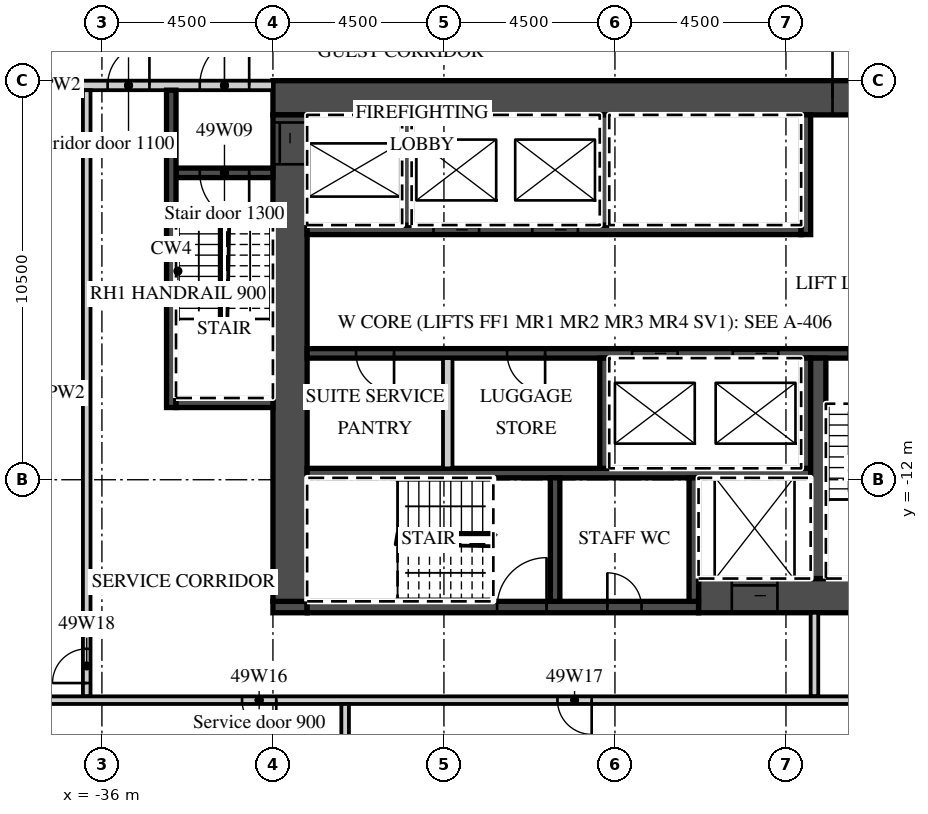
"""IFC4 building model, lengths in metres.
Left out: names, types, materials, properties, quantities, classifications, styles, units other than length and angle.
Written with IfcOpenShell. Run it as: python <this file> out.ifc"""

import sys

from ifc_helpers import new_model, si_unit, direction, frame, frame_2d, origin, place, context, subcontext, project, spatial, rectangle, extrude, element, fill, save


model = new_model("IFC4")
c1 = context("Model", 3, precision=1e-05, world=origin(), true_north=direction((0.0, 1.0)))
c2 = subcontext(c1, "Body", "Model", "MODEL_VIEW")
j1 = project(units=[si_unit("LENGTHUNIT", "METRE"), si_unit("PLANEANGLEUNIT", "RADIAN")], contexts=[c1])
p1 = place(None, origin())
s1 = spatial("IfcSite", under=j1, at=p1, CompositionType="ELEMENT")
p2 = place(p1, origin())
s2 = spatial("IfcBuilding", under=s1, at=p2, CompositionType="ELEMENT")
p3 = place(p2, frame((0.0, 0.0, 203.2)))
s3 = spatial("IfcBuildingStorey", under=s2, at=p3, CompositionType="ELEMENT", Elevation=203.2)
p4 = place(p3, frame((-31.5, -1.95, 0.0), z_axis=(0.0, 0.0, 1.0), x_axis=(1.0, 0.0, 0.0)))
e1 = element("IfcWall", 1, at=p4, inside=s3, PredefinedType="SHEAR", context=c2, shape_type="SweptSolid", body=[
    extrude(rectangle(XDim=18.0, YDim=0.9, at=frame_2d((9.0, 0.0))), origin(), (0.0, 0.0, 1.0), 3.0),
])
p5 = place(p4, frame((14.725, 0.0, 0.0)))
e2 = element("IfcOpeningElement", 2, at=p5, cuts=e1, PredefinedType="OPENING", context=c2, shape_type="SweptSolid", body=[
    extrude(rectangle(XDim=1.8, YDim=2.1, at=frame_2d((0.9, 1.05))), frame((0.0, 0.46, 0.0), z_axis=(0.0, -1.0, 0.0), x_axis=(1.0, 0.0, 0.0)), (0.0, 0.0, 1.0), 0.92),
])
p6 = place(p3, frame((-20.3, -15.05, 0.0), z_axis=(0.0, 0.0, 1.0), x_axis=(1.0, 0.0, 0.0)))
e3 = element("IfcWall", 3, at=p6, inside=s3, PredefinedType="SHEAR", context=c2, shape_type="SweptSolid", body=[
    extrude(rectangle(XDim=6.8, YDim=0.9, at=frame_2d((3.4, 0.0))), origin(), (0.0, 0.0, 1.0), 3.0),
])
p7 = place(p6, frame((0.875, 0.0, 0.0)))
e4 = element("IfcOpeningElement", 4, at=p7, cuts=e3, PredefinedType="OPENING", context=c2, shape_type="SweptSolid", body=[
    extrude(rectangle(XDim=1.2, YDim=2.1, at=frame_2d((0.6, 1.05))), frame((0.0, 0.46, 0.0), z_axis=(0.0, -1.0, 0.0), x_axis=(1.0, 0.0, 0.0)), (0.0, 0.0, 1.0), 0.92),
])
p8 = place(p3, frame((-31.5, -15.35, 0.0), z_axis=(0.0, 0.0, 1.0), x_axis=(1.0, 0.0, 0.0)))
e5 = element("IfcWall", 5, at=p8, inside=s3, PredefinedType="SHEAR", context=c2, shape_type="SweptSolid", body=[
    extrude(rectangle(XDim=0.9, YDim=0.3, at=frame_2d((0.45, 0.0))), origin(), (0.0, 0.0, 1.0), 3.0),
])
p9 = place(p3, frame((-30.6, -15.35, 0.0), z_axis=(0.0, 0.0, 1.0), x_axis=(1.0, 0.0, 0.0)))
e6 = element("IfcWall", 6, at=p9, inside=s3, PredefinedType="SHEAR", context=c2, shape_type="SweptSolid", body=[
    extrude(rectangle(XDim=10.3, YDim=0.3, at=frame_2d((5.15, 0.0))), origin(), (0.0, 0.0, 1.0), 3.0),
])
p10 = place(p9, frame((5.0, 0.0, 0.0)))
e7 = element("IfcOpeningElement", 7, at=p10, cuts=e6, PredefinedType="OPENING", context=c2, shape_type="SweptSolid", body=[
    extrude(rectangle(XDim=1.3, YDim=2.1, at=frame_2d((0.65, 1.05))), frame((0.0, 0.16, 0.0), z_axis=(0.0, -1.0, 0.0), x_axis=(1.0, 0.0, 0.0)), (0.0, 0.0, 1.0), 0.32),
])
p11 = place(p9, frame((7.9, 0.0, 0.0)))
e8 = element("IfcOpeningElement", 8, at=p11, cuts=e6, PredefinedType="OPENING", context=c2, shape_type="SweptSolid", body=[
    extrude(rectangle(XDim=0.9, YDim=2.1, at=frame_2d((0.45, 1.05))), frame((0.0, 0.16, 0.0), z_axis=(0.0, -1.0, 0.0), x_axis=(1.0, 0.0, 0.0)), (0.0, 0.0, 1.0), 0.32),
])
p12 = place(p3, frame((-31.05, -15.2, 0.0), z_axis=(0.0, 0.0, 1.0), x_axis=(0.0, 1.0, 0.0)))
e9 = element("IfcWall", 9, at=p12, inside=s3, PredefinedType="SHEAR", context=c2, shape_type="SweptSolid", body=[
    extrude(rectangle(XDim=12.8, YDim=0.9, at=frame_2d((6.4, 0.0))), origin(), (0.0, 0.0, 1.0), 3.0),
])
p13 = place(p12, frame((11.5, 0.0, 0.0)))
e10 = element("IfcOpeningElement", 10, at=p13, cuts=e9, PredefinedType="OPENING", context=c2, shape_type="SweptSolid", body=[
    extrude(rectangle(XDim=1.1, YDim=2.1, at=frame_2d((0.55, 1.05))), frame((0.0, 0.46, 0.0), z_axis=(0.0, -1.0, 0.0), x_axis=(1.0, 0.0, 0.0)), (0.0, 0.0, 1.0), 0.92),
])
p14 = place(p3, frame((-30.6, -5.425, 0.0), z_axis=(0.0, 0.0, 1.0), x_axis=(1.0, 0.0, 0.0)))
e11 = element("IfcWall", 11, at=p14, inside=s3, PredefinedType="SHEAR", context=c2, shape_type="SweptSolid", body=[
    extrude(rectangle(XDim=13.0, YDim=0.25, at=frame_2d((6.5, 0.0))), origin(), (0.0, 0.0, 1.0), 3.0),
])
p15 = place(p14, frame((3.325, 0.0, 0.0)))
e12 = element("IfcOpeningElement", 12, at=p15, cuts=e11, PredefinedType="OPENING", context=c2, shape_type="SweptSolid", body=[
    extrude(rectangle(XDim=1.2, YDim=2.1, at=frame_2d((0.6, 1.05))), frame((0.0, 0.135, 0.0), z_axis=(0.0, -1.0, 0.0), x_axis=(1.0, 0.0, 0.0)), (0.0, 0.0, 1.0), 0.27),
])
p16 = place(p14, frame((5.925, 0.0, 0.0)))
e13 = element("IfcOpeningElement", 13, at=p16, cuts=e11, PredefinedType="OPENING", context=c2, shape_type="SweptSolid", body=[
    extrude(rectangle(XDim=1.2, YDim=2.1, at=frame_2d((0.6, 1.05))), frame((0.0, 0.135, 0.0), z_axis=(0.0, -1.0, 0.0), x_axis=(1.0, 0.0, 0.0)), (0.0, 0.0, 1.0), 0.27),
])
p17 = place(p3, frame((-17.475, -5.55, 0.0), z_axis=(0.0, 0.0, 1.0), x_axis=(0.0, 1.0, 0.0)))
e14 = element("IfcWall", 14, at=p17, inside=s3, PredefinedType="SHEAR", context=c2, shape_type="SweptSolid", body=[
    extrude(rectangle(XDim=3.15, YDim=0.25, at=frame_2d((1.575, 0.0))), origin(), (0.0, 0.0, 1.0), 3.0),
])
for number, where, z_axis, x_axis in (
    (15, (-27.975, -5.3, 0.0), (0.0, 0.0, 1.0), (0.0, 1.0, 0.0)),
    (16, (-22.775, -5.3, 0.0), (0.0, 0.0, 1.0), (0.0, 1.0, 0.0)),
):
    element("IfcWall", number, at=place(p3, frame(where, z_axis=z_axis, x_axis=x_axis)), inside=s3, PredefinedType="SHEAR", context=c2, shape_type="SweptSolid", body=[
        extrude(rectangle(XDim=2.9, YDim=0.25, at=frame_2d((1.45, 0.0))), origin(), (0.0, 0.0, 1.0), 3.0),
    ])
p18 = place(p3, frame((-30.6, -8.675, 0.0), z_axis=(0.0, 0.0, 1.0), x_axis=(1.0, 0.0, 0.0)))
e17 = element("IfcWall", 17, at=p18, inside=s3, PredefinedType="SHEAR", context=c2, shape_type="SweptSolid", body=[
    extrude(rectangle(XDim=16.2, YDim=0.25, at=frame_2d((8.1, 0.0))), origin(), (0.0, 0.0, 1.0), 3.0),
])
p19 = place(p18, frame((8.55, 0.0, 0.0)))
e18 = element("IfcOpeningElement", 18, at=p19, cuts=e17, PredefinedType="OPENING", context=c2, shape_type="SweptSolid", body=[
    extrude(rectangle(XDim=1.2, YDim=2.1, at=frame_2d((0.6, 1.05))), frame((0.0, 0.135, 0.0), z_axis=(0.0, -1.0, 0.0), x_axis=(1.0, 0.0, 0.0)), (0.0, 0.0, 1.0), 0.27),
])
p20 = place(p18, frame((11.2, 0.0, 0.0)))
e19 = element("IfcOpeningElement", 19, at=p20, cuts=e17, PredefinedType="OPENING", context=c2, shape_type="SweptSolid", body=[
    extrude(rectangle(XDim=1.2, YDim=2.1, at=frame_2d((0.6, 1.05))), frame((0.0, 0.135, 0.0), z_axis=(0.0, -1.0, 0.0), x_axis=(1.0, 0.0, 0.0)), (0.0, 0.0, 1.0), 0.27),
])
p21 = place(p18, frame((14.25, 0.0, 0.0)))
e20 = element("IfcOpeningElement", 20, at=p21, cuts=e17, PredefinedType="OPENING", context=c2, shape_type="SweptSolid", body=[
    extrude(rectangle(XDim=1.3, YDim=2.1, at=frame_2d((0.65, 1.05))), frame((0.0, 0.135, 0.0), z_axis=(0.0, -1.0, 0.0), x_axis=(1.0, 0.0, 0.0)), (0.0, 0.0, 1.0), 0.27),
])
p22 = place(p18, frame((1.288, 0.0, 0.0)))
e21 = element("IfcOpeningElement", 21, at=p22, cuts=e17, PredefinedType="OPENING", context=c2, shape_type="SweptSolid", body=[
    extrude(rectangle(XDim=1.0, YDim=2.1, at=frame_2d((0.5, 1.05))), frame((0.0, 0.135, 0.0), z_axis=(0.0, -1.0, 0.0), x_axis=(1.0, 0.0, 0.0)), (0.0, 0.0, 1.0), 0.27),
])
p23 = place(p18, frame((5.262, 0.0, 0.0)))
e22 = element("IfcOpeningElement", 22, at=p23, cuts=e17, PredefinedType="OPENING", context=c2, shape_type="SweptSolid", body=[
    extrude(rectangle(XDim=1.0, YDim=2.1, at=frame_2d((0.5, 1.05))), frame((0.0, 0.135, 0.0), z_axis=(0.0, -1.0, 0.0), x_axis=(1.0, 0.0, 0.0)), (0.0, 0.0, 1.0), 0.27),
])
p24 = place(p3, frame((-30.6, -11.825, 0.0), z_axis=(0.0, 0.0, 1.0), x_axis=(1.0, 0.0, 0.0)))
e23 = element("IfcWall", 23, at=p24, inside=s3, PredefinedType="SHEAR", context=c2, shape_type="SweptSolid", body=[
    extrude(rectangle(XDim=13.25, YDim=0.25, at=frame_2d((6.625, 0.0))), origin(), (0.0, 0.0, 1.0), 3.0),
])
for number, where, z_axis, x_axis in (
    (24, (-17.475, -11.7, 0.0), (0.0, 0.0, 1.0), (0.0, 1.0, 0.0)),
    (25, (-22.775, -11.7, 0.0), (0.0, 0.0, 1.0), (0.0, 1.0, 0.0)),
):
    element("IfcWall", number, at=place(p3, frame(where, z_axis=z_axis, x_axis=x_axis)), inside=s3, PredefinedType="SHEAR", context=c2, shape_type="SweptSolid", body=[
        extrude(rectangle(XDim=2.9, YDim=0.25, at=frame_2d((1.45, 0.0))), origin(), (0.0, 0.0, 1.0), 3.0),
    ])
p25 = place(p3, frame((-26.9, -11.7, 0.0), z_axis=(0.0, 0.0, 1.0), x_axis=(0.0, 1.0, 0.0)))
e26 = element("IfcWall", 26, at=p25, inside=s3, PredefinedType="PARTITIONING", context=c2, shape_type="SweptSolid", body=[
    extrude(rectangle(XDim=2.9, YDim=0.25, at=frame_2d((1.45, 0.0))), origin(), (0.0, 0.0, 1.0), 3.0),
])
p26 = place(p3, frame((-17.15, -14.6, 0.0), z_axis=(0.0, 0.0, 1.0), x_axis=(0.0, 1.0, 0.0)))
e27 = element("IfcWall", 27, at=p26, inside=s3, PredefinedType="SHEAR", context=c2, shape_type="SweptSolid", body=[
    extrude(rectangle(XDim=5.8, YDim=0.4, at=frame_2d((2.9, 0.0))), origin(), (0.0, 0.0, 1.0), 3.0),
])
for number, where, z_axis, x_axis in (
    (28, (-20.425, -15.2, 0.0), (0.0, 0.0, 1.0), (0.0, 1.0, 0.0)),
    (29, (-24.075, -15.2, 0.0), (0.0, 0.0, 1.0), (0.0, 1.0, 0.0)),
):
    element("IfcWall", number, at=place(p3, frame(where, z_axis=z_axis, x_axis=x_axis)), inside=s3, PredefinedType="SHEAR", context=c2, shape_type="SweptSolid", body=[
        extrude(rectangle(XDim=3.25, YDim=0.25, at=frame_2d((1.625, 0.0))), origin(), (0.0, 0.0, 1.0), 3.0),
    ])
p27 = place(p3, frame((-42.632, -1.625, 0.0), z_axis=(0.0, 0.0, 1.0), x_axis=(1.0, 0.0, 0.0)))
e30 = element("IfcWall", 30, at=p27, inside=s3, PredefinedType="PARTITIONING", context=c2, shape_type="SweptSolid", body=[
    extrude(rectangle(XDim=11.132, YDim=0.25, at=frame_2d((5.566, 0.0))), origin(), (0.0, 0.0, 1.0), 3.0),
])
p28 = place(p27, frame((9.207, 0.0, 0.0)))
e31 = element("IfcOpeningElement", 31, at=p28, cuts=e30, PredefinedType="OPENING", context=c2, shape_type="SweptSolid", body=[
    extrude(rectangle(XDim=1.3, YDim=2.1, at=frame_2d((0.65, 1.05))), frame((0.0, 0.135, 0.0), z_axis=(0.0, -1.0, 0.0), x_axis=(1.0, 0.0, 0.0)), (0.0, 0.0, 1.0), 0.27),
])
p29 = place(p27, frame((6.781, 0.0, 0.0)))
e32 = element("IfcOpeningElement", 32, at=p29, cuts=e30, PredefinedType="OPENING", context=c2, shape_type="SweptSolid", body=[
    extrude(rectangle(XDim=1.1, YDim=2.1, at=frame_2d((0.55, 1.05))), frame((0.0, 0.135, 0.0), z_axis=(0.0, -1.0, 0.0), x_axis=(1.0, 0.0, 0.0)), (0.0, 0.0, 1.0), 0.27),
])
p30 = place(p3, frame((-34.05, -3.925, 0.0), z_axis=(0.0, 0.0, 1.0), x_axis=(1.0, 0.0, 0.0)))
e33 = element("IfcWall", 33, at=p30, inside=s3, PredefinedType="SHEAR", context=c2, shape_type="SweptSolid", body=[
    extrude(rectangle(XDim=2.55, YDim=0.25, at=frame_2d((1.275, 0.0))), origin(), (0.0, 0.0, 1.0), 3.0),
])
p31 = place(p30, frame((0.625, 0.0, 0.0)))
e34 = element("IfcOpeningElement", 34, at=p31, cuts=e33, PredefinedType="OPENING", context=c2, shape_type="SweptSolid", body=[
    extrude(rectangle(XDim=1.3, YDim=2.1, at=frame_2d((0.65, 1.05))), frame((0.0, 0.135, 0.0), z_axis=(0.0, -1.0, 0.0), x_axis=(1.0, 0.0, 0.0)), (0.0, 0.0, 1.0), 0.27),
])
p32 = place(p3, frame((-34.175, -10.1, 0.0), z_axis=(0.0, 0.0, 1.0), x_axis=(0.0, 1.0, 0.0)))
e35 = element("IfcWall", 35, at=p32, inside=s3, PredefinedType="SHEAR", context=c2, shape_type="SweptSolid", body=[
    extrude(rectangle(XDim=8.35, YDim=0.25, at=frame_2d((4.175, 0.0))), origin(), (0.0, 0.0, 1.0), 3.0),
])
p33 = place(p3, frame((-34.05, -9.975, 0.0), z_axis=(0.0, 0.0, 1.0), x_axis=(1.0, 0.0, 0.0)))
e36 = element("IfcWall", 36, at=p33, inside=s3, PredefinedType="SHEAR", context=c2, shape_type="SweptSolid", body=[
    extrude(rectangle(XDim=2.55, YDim=0.25, at=frame_2d((1.275, 0.0))), origin(), (0.0, 0.0, 1.0), 3.0),
])
p34 = place(p3, frame((-17.25, -17.7, 0.0), z_axis=(0.0, 0.0, 1.0), x_axis=(0.0, 1.0, 0.0)))
e37 = element("IfcWall", 37, at=p34, inside=s3, PredefinedType="PARTITIONING", context=c2, shape_type="SweptSolid", body=[
    extrude(rectangle(XDim=2.2, YDim=0.2, at=frame_2d((1.1, 0.0))), origin(), (0.0, 0.0, 1.0), 3.0),
])
p35 = place(p3, frame((-36.4, -17.7, 0.0), z_axis=(0.0, 0.0, 1.0), x_axis=(0.0, 1.0, 0.0)))
e38 = element("IfcWall", 38, at=p35, inside=s3, PredefinedType="PARTITIONING", context=c2, shape_type="SweptSolid", body=[
    extrude(rectangle(XDim=15.95, YDim=0.2, at=frame_2d((7.975, 0.0))), origin(), (0.0, 0.0, 1.0), 3.0),
])
p36 = place(p35, frame((0.35, 0.0, 0.0)))
e39 = element("IfcOpeningElement", 39, at=p36, cuts=e38, PredefinedType="OPENING", context=c2, shape_type="SweptSolid", body=[
    extrude(rectangle(XDim=0.9, YDim=2.1, at=frame_2d((0.45, 1.05))), frame((0.0, 0.11, 0.0), z_axis=(0.0, -1.0, 0.0), x_axis=(1.0, 0.0, 0.0)), (0.0, 0.0, 1.0), 0.22),
])
p37 = place(p3, frame((-41.074, -17.8, 0.0), z_axis=(0.0, 0.0, 1.0), x_axis=(1.0, 0.0, 0.0)))
e40 = element("IfcWall", 40, at=p37, inside=s3, PredefinedType="PARTITIONING", context=c2, shape_type="SweptSolid", body=[
    extrude(rectangle(XDim=27.474, YDim=0.2, at=frame_2d((13.737, 0.0))), origin(), (0.0, 0.0, 1.0), 3.0),
])
p38 = place(p37, frame((8.762, 0.0, 0.0)))
e41 = element("IfcOpeningElement", 41, at=p38, cuts=e40, PredefinedType="OPENING", context=c2, shape_type="SweptSolid", body=[
    extrude(rectangle(XDim=0.9, YDim=2.1, at=frame_2d((0.45, 1.05))), frame((0.0, 0.11, 0.0), z_axis=(0.0, -1.0, 0.0), x_axis=(1.0, 0.0, 0.0)), (0.0, 0.0, 1.0), 0.22),
])
p39 = place(p37, frame((17.062, 0.0, 0.0)))
e42 = element("IfcOpeningElement", 42, at=p39, cuts=e40, PredefinedType="OPENING", context=c2, shape_type="SweptSolid", body=[
    extrude(rectangle(XDim=0.9, YDim=2.1, at=frame_2d((0.45, 1.05))), frame((0.0, 0.11, 0.0), z_axis=(0.0, -1.0, 0.0), x_axis=(1.0, 0.0, 0.0)), (0.0, 0.0, 1.0), 0.22),
])
p40 = place(p3, frame((-29.6, -23.852, 0.0), z_axis=(0.0, 0.0, 1.0), x_axis=(0.0, 1.0, 0.0)))
e43 = element("IfcWall", 43, at=p40, inside=s3, PredefinedType="PARTITIONING", context=c2, shape_type="SweptSolid", body=[
    extrude(rectangle(XDim=5.952, YDim=0.2, at=frame_2d((2.976, 0.0))), origin(), (0.0, 0.0, 1.0), 3.0),
])
p41 = place(p19, origin())
e44 = element("IfcDoor", 44, at=p41, inside=s3, OperationType="SLIDING_TO_LEFT", PredefinedType="DOOR", context=c2, shape_type="SweptSolid", body=[
    extrude(rectangle(XDim=1.2, YDim=2.1, at=frame_2d((0.6, 1.05))), frame((0.0, 0.025, 0.0), z_axis=(0.0, -1.0, 0.0), x_axis=(1.0, 0.0, 0.0)), (0.0, 0.0, 1.0), 0.05),
])
fill(e18, e44)
p42 = place(p20, origin())
e45 = element("IfcDoor", 45, at=p42, inside=s3, OperationType="SLIDING_TO_RIGHT", PredefinedType="DOOR", context=c2, shape_type="SweptSolid", body=[
    extrude(rectangle(XDim=1.2, YDim=2.1, at=frame_2d((0.6, 1.05))), frame((0.0, 0.025, 0.0), z_axis=(0.0, -1.0, 0.0), x_axis=(1.0, 0.0, 0.0)), (0.0, 0.0, 1.0), 0.05),
])
fill(e19, e45)
p43 = place(p15, origin())
e46 = element("IfcDoor", 46, at=p43, inside=s3, OperationType="SLIDING_TO_RIGHT", PredefinedType="DOOR", context=c2, shape_type="SweptSolid", body=[
    extrude(rectangle(XDim=1.2, YDim=2.1, at=frame_2d((0.6, 1.05))), frame((0.0, 0.025, 0.0), z_axis=(0.0, -1.0, 0.0), x_axis=(1.0, 0.0, 0.0)), (0.0, 0.0, 1.0), 0.05),
])
fill(e12, e46)
p44 = place(p16, origin())
e47 = element("IfcDoor", 47, at=p44, inside=s3, OperationType="SLIDING_TO_RIGHT", PredefinedType="DOOR", context=c2, shape_type="SweptSolid", body=[
    extrude(rectangle(XDim=1.2, YDim=2.1, at=frame_2d((0.6, 1.05))), frame((0.0, 0.025, 0.0), z_axis=(0.0, -1.0, 0.0), x_axis=(1.0, 0.0, 0.0)), (0.0, 0.0, 1.0), 0.05),
])
fill(e13, e47)
p45 = place(p7, origin())
e48 = element("IfcDoor", 48, at=p45, inside=s3, OperationType="SLIDING_TO_LEFT", PredefinedType="DOOR", context=c2, shape_type="SweptSolid", body=[
    extrude(rectangle(XDim=1.2, YDim=2.1, at=frame_2d((0.6, 1.05))), frame((0.0, 0.025, 0.0), z_axis=(0.0, -1.0, 0.0), x_axis=(1.0, 0.0, 0.0)), (0.0, 0.0, 1.0), 0.05),
])
fill(e4, e48)
p46 = place(p13, origin())
e49 = element("IfcDoor", 49, at=p46, inside=s3, OperationType="SLIDING_TO_RIGHT", PredefinedType="DOOR", context=c2, shape_type="SweptSolid", body=[
    extrude(rectangle(XDim=1.1, YDim=2.1, at=frame_2d((0.55, 1.05))), frame((0.0, 0.025, 0.0), z_axis=(0.0, -1.0, 0.0), x_axis=(1.0, 0.0, 0.0)), (0.0, 0.0, 1.0), 0.05),
])
fill(e10, e49)
p47 = place(p5, origin())
e50 = element("IfcDoor", 50, at=p47, inside=s3, OperationType="DOUBLE_DOOR_DOUBLE_SWING", PredefinedType="DOOR", context=c2, shape_type="SweptSolid", body=[
    extrude(rectangle(XDim=1.8, YDim=2.1, at=frame_2d((0.9, 1.05))), frame((0.0, 0.025, 0.0), z_axis=(0.0, -1.0, 0.0), x_axis=(1.0, 0.0, 0.0)), (0.0, 0.0, 1.0), 0.05),
])
fill(e2, e50)
p48 = place(p28, origin())
e51 = element("IfcDoor", 51, at=p48, inside=s3, OperationType="SINGLE_SWING_RIGHT", PredefinedType="DOOR", context=c2, shape_type="SweptSolid", body=[
    extrude(rectangle(XDim=1.3, YDim=2.1, at=frame_2d((0.65, 1.05))), frame((0.0, 0.025, 0.0), z_axis=(0.0, -1.0, 0.0), x_axis=(1.0, 0.0, 0.0)), (0.0, 0.0, 1.0), 0.05),
])
fill(e31, e51)
p49 = place(p31, origin())
e52 = element("IfcDoor", 52, at=p49, inside=s3, OperationType="SINGLE_SWING_RIGHT", PredefinedType="DOOR", context=c2, shape_type="SweptSolid", body=[
    extrude(rectangle(XDim=1.3, YDim=2.1, at=frame_2d((0.65, 1.05))), frame((0.0, 0.025, 0.0), z_axis=(0.0, -1.0, 0.0), x_axis=(1.0, 0.0, 0.0)), (0.0, 0.0, 1.0), 0.05),
])
fill(e34, e52)
p50 = place(p29, origin())
e53 = element("IfcDoor", 53, at=p50, inside=s3, OperationType="SINGLE_SWING_RIGHT", PredefinedType="DOOR", context=c2, shape_type="SweptSolid", body=[
    extrude(rectangle(XDim=1.1, YDim=2.1, at=frame_2d((0.55, 1.05))), frame((0.0, 0.025, 0.0), z_axis=(0.0, -1.0, 0.0), x_axis=(1.0, 0.0, 0.0)), (0.0, 0.0, 1.0), 0.05),
])
fill(e32, e53)
p51 = place(p21, origin())
e54 = element("IfcDoor", 54, at=p51, inside=s3, OperationType="SINGLE_SWING_RIGHT", PredefinedType="DOOR", context=c2, shape_type="SweptSolid", body=[
    extrude(rectangle(XDim=1.3, YDim=2.1, at=frame_2d((0.65, 1.05))), frame((0.0, 0.025, 0.0), z_axis=(0.0, -1.0, 0.0), x_axis=(1.0, 0.0, 0.0)), (0.0, 0.0, 1.0), 0.05),
])
fill(e20, e54)
p52 = place(p10, origin())
e55 = element("IfcDoor", 55, at=p52, inside=s3, OperationType="SINGLE_SWING_RIGHT", PredefinedType="DOOR", context=c2, shape_type="SweptSolid", body=[
    extrude(rectangle(XDim=1.3, YDim=2.1, at=frame_2d((0.65, 1.05))), frame((0.0, 0.025, 0.0), z_axis=(0.0, -1.0, 0.0), x_axis=(1.0, 0.0, 0.0)), (0.0, 0.0, 1.0), 0.05),
])
fill(e7, e55)
p53 = place(p11, origin())
e56 = element("IfcDoor", 56, at=p53, inside=s3, OperationType="SINGLE_SWING_LEFT", PredefinedType="DOOR", context=c2, shape_type="SweptSolid", body=[
    extrude(rectangle(XDim=0.9, YDim=2.1, at=frame_2d((0.45, 1.05))), frame((0.0, 0.025, 0.0), z_axis=(0.0, -1.0, 0.0), x_axis=(1.0, 0.0, 0.0)), (0.0, 0.0, 1.0), 0.05),
])
fill(e8, e56)
p54 = place(p22, origin())
e57 = element("IfcDoor", 57, at=p54, inside=s3, OperationType="SINGLE_SWING_RIGHT", PredefinedType="DOOR", context=c2, shape_type="SweptSolid", body=[
    extrude(rectangle(XDim=1.0, YDim=2.1, at=frame_2d((0.5, 1.05))), frame((0.0, 0.025, 0.0), z_axis=(0.0, -1.0, 0.0), x_axis=(1.0, 0.0, 0.0)), (0.0, 0.0, 1.0), 0.05),
])
fill(e21, e57)
p55 = place(p23, origin())
e58 = element("IfcDoor", 58, at=p55, inside=s3, OperationType="SINGLE_SWING_RIGHT", PredefinedType="DOOR", context=c2, shape_type="SweptSolid", body=[
    extrude(rectangle(XDim=1.0, YDim=2.1, at=frame_2d((0.5, 1.05))), frame((0.0, 0.025, 0.0), z_axis=(0.0, -1.0, 0.0), x_axis=(1.0, 0.0, 0.0)), (0.0, 0.0, 1.0), 0.05),
])
fill(e22, e58)
p56 = place(p38, origin())
e59 = element("IfcDoor", 59, at=p56, inside=s3, OperationType="SINGLE_SWING_RIGHT", PredefinedType="DOOR", context=c2, shape_type="SweptSolid", body=[
    extrude(rectangle(XDim=0.9, YDim=2.1, at=frame_2d((0.45, 1.05))), frame((0.0, 0.025, 0.0), z_axis=(0.0, -1.0, 0.0), x_axis=(1.0, 0.0, 0.0)), (0.0, 0.0, 1.0), 0.05),
])
fill(e41, e59)
p57 = place(p39, origin())
e60 = element("IfcDoor", 60, at=p57, inside=s3, OperationType="SINGLE_SWING_RIGHT", PredefinedType="DOOR", context=c2, shape_type="SweptSolid", body=[
    extrude(rectangle(XDim=0.9, YDim=2.1, at=frame_2d((0.45, 1.05))), frame((0.0, 0.025, 0.0), z_axis=(0.0, -1.0, 0.0), x_axis=(1.0, 0.0, 0.0)), (0.0, 0.0, 1.0), 0.05),
])
fill(e42, e60)
p58 = place(p36, origin())
e61 = element("IfcDoor", 61, at=p58, inside=s3, OperationType="SINGLE_SWING_LEFT", PredefinedType="DOOR", context=c2, shape_type="SweptSolid", body=[
    extrude(rectangle(XDim=0.9, YDim=2.1, at=frame_2d((0.45, 1.05))), frame((0.0, 0.025, 0.0), z_axis=(0.0, -1.0, 0.0), x_axis=(1.0, 0.0, 0.0)), (0.0, 0.0, 1.0), 0.05),
])
fill(e39, e61)
save(model, sys.argv[1])
